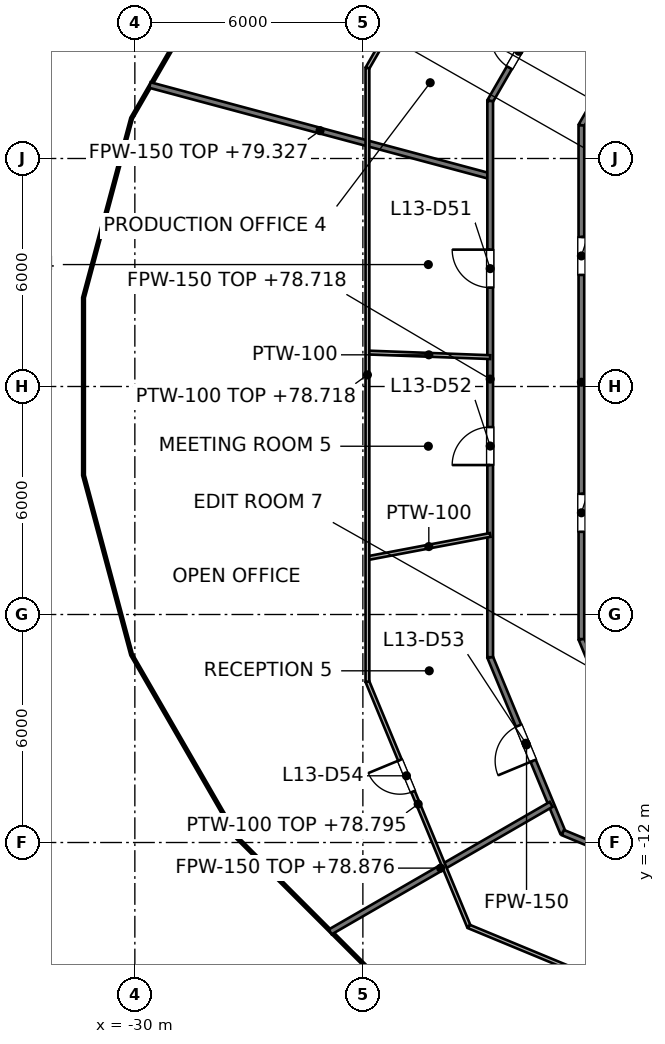
"""IFC4 building model, lengths in metres.
Left out: names, types, materials, properties, quantities, classifications, styles, units other than length and angle.
Written with IfcOpenShell. Run it as: python <this file> out.ifc"""

import sys

from ifc_helpers import new_model, si_unit, direction, frame, frame_2d, origin, place, context, subcontext, project, spatial, rectangle, extrude, element, fill, save


model = new_model("IFC4")
c1 = context("Model", 3, precision=1e-05, world=origin(), true_north=direction((0.0, 1.0)))
c2 = subcontext(c1, "Body", "Model", "MODEL_VIEW")
j1 = project(units=[si_unit("LENGTHUNIT", "METRE"), si_unit("PLANEANGLEUNIT", "RADIAN")], contexts=[c1])
p1 = place(None, origin())
s1 = spatial("IfcSite", under=j1, at=p1, CompositionType="ELEMENT")
p2 = place(p1, origin())
s2 = spatial("IfcBuilding", under=s1, at=p2, CompositionType="ELEMENT")
p3 = place(p2, frame((0.0, 0.0, 75.6)))
s3 = spatial("IfcBuildingStorey", under=s2, at=p3, CompositionType="ELEMENT", Elevation=75.6)
p4 = place(p3, frame((-20.65, -7.124, 0.0), z_axis=(0.0, 0.0, 1.0), x_axis=(0.382941772901, -0.923772482036, 0.0)))
e1 = element("IfcWall", 1, at=p4, inside=s3, PredefinedType="PARTITIONING", context=c2, shape_type="SweptSolid", body=[
    extrude(rectangle(XDim=4.994, YDim=0.15, at=frame_2d((2.497, 0.0))), origin(), (0.0, 0.0, 1.0), 3.195),
])
p5 = place(p4, frame((1.95, 0.0, 0.0)))
e2 = element("IfcOpeningElement", 2, at=p5, cuts=e1, PredefinedType="OPENING", context=c2, shape_type="SweptSolid", body=[
    extrude(rectangle(XDim=1.0, YDim=2.1, at=frame_2d((0.5, 1.05))), frame((0.0, 0.075, 0.0), z_axis=(0.0, -1.0, 0.0), x_axis=(1.0, 0.0, 0.0)), (0.0, 0.0, 1.0), 0.15),
])
p6 = place(p3, frame((-18.25, -6.647, 0.0), z_axis=(0.0, 0.0, 1.0), x_axis=(0.383000597973, -0.923748094424, 0.0)))
e3 = element("IfcWall", 3, at=p6, inside=s3, PredefinedType="PARTITIONING", context=c2, shape_type="SweptSolid", body=[
    extrude(rectangle(XDim=3.522, YDim=0.15, at=frame_2d((1.761, 0.0))), origin(), (0.0, 0.0, 1.0), 3.195),
])
p7 = place(p3, frame((-18.738, -11.738, 0.0), z_axis=(0.0, 0.0, 1.0), x_axis=(0.923848598814, -0.38275810438, 0.0)))
e4 = element("IfcWall", 4, at=p7, inside=s3, PredefinedType="PARTITIONING", context=c2, shape_type="SweptSolid", body=[
    extrude(rectangle(XDim=5.024, YDim=0.15, at=frame_2d((2.512, 0.0))), origin(), (0.0, 0.0, 1.0), 3.195),
])
p8 = place(p7, frame((2.012, 0.0, 0.0)))
e5 = element("IfcOpeningElement", 5, at=p8, cuts=e4, PredefinedType="OPENING", context=c2, shape_type="SweptSolid", body=[
    extrude(rectangle(XDim=1.0, YDim=2.1, at=frame_2d((0.5, 1.05))), frame((0.0, 0.075, 0.0), z_axis=(0.0, -1.0, 0.0), x_axis=(1.0, 0.0, 0.0)), (0.0, 0.0, 1.0), 0.15),
])
p9 = place(p3, frame((-18.151, 7.042, 0.0), z_axis=(0.0, 0.0, 1.0), x_axis=(0.93232154811, -0.361630378881, 0.0)))
e6 = element("IfcWall", 6, at=p9, inside=s3, PredefinedType="PARTITIONING", context=c2, shape_type="SweptSolid", body=[
    extrude(rectangle(XDim=3.38, YDim=0.15, at=frame_2d((1.69, 0.0))), origin(), (0.0, 0.0, 1.0), 4.05),
])
p10 = place(p3, frame((-29.605, 7.933, 0.0), z_axis=(0.0, 0.0, 1.0), x_axis=(0.965908551929, -0.258883505289, 0.0)))
e7 = element("IfcWall", 7, at=p10, inside=s3, PredefinedType="PARTITIONING", context=c2, shape_type="SweptSolid", body=[
    extrude(rectangle(XDim=9.271, YDim=0.15, at=frame_2d((4.636, 0.0))), origin(), (0.0, 0.0, 1.0), 3.727),
])
p11 = place(p3, frame((-18.25, -0.101, 0.0), z_axis=(0.0, 0.0, 1.0), x_axis=(0.999985777013, 0.005333457795, 0.0)))
e8 = element("IfcWall", 8, at=p11, inside=s3, PredefinedType="PARTITIONING", context=c2, shape_type="SweptSolid", body=[
    extrude(rectangle(XDim=3.25, YDim=0.15, at=frame_2d((1.625, 0.0))), origin(), (0.0, 0.0, 1.0), 3.118),
])
p12 = place(p3, frame((-24.859, -14.352, 0.0), z_axis=(0.0, 0.0, 1.0), x_axis=(0.866036584562, 0.499980633826, 0.0)))
e9 = element("IfcWall", 9, at=p12, inside=s3, PredefinedType="PARTITIONING", context=c2, shape_type="SweptSolid", body=[
    extrude(rectangle(XDim=6.712, YDim=0.15, at=frame_2d((3.356, 0.0))), origin(), (0.0, 0.0, 1.0), 3.276),
])
p13 = place(p3, frame((-18.25, 6.871, 0.0), z_axis=(0.0, 0.0, 1.0), x_axis=(0.500254304961, 0.865878530955, 0.0)))
e10 = element("IfcWall", 10, at=p13, inside=s3, PredefinedType="PARTITIONING", context=c2, shape_type="SweptSolid", body=[
    extrude(rectangle(XDim=4.715, YDim=0.15, at=frame_2d((2.357, 0.0))), origin(), (0.0, 0.0, 1.0), 3.195),
])
p14 = place(p13, frame((1.81, 0.0, 0.0)))
e11 = element("IfcOpeningElement", 11, at=p14, cuts=e10, PredefinedType="OPENING", context=c2, shape_type="SweptSolid", body=[
    extrude(rectangle(XDim=1.0, YDim=2.1, at=frame_2d((0.5, 1.05))), frame((0.0, 0.075, 0.0), z_axis=(0.0, -1.0, 0.0), x_axis=(1.0, 0.0, 0.0)), (0.0, 0.0, 1.0), 0.15),
])
p15 = place(p3, frame((-20.65, 7.514, 0.0), z_axis=(0.0, 0.0, 1.0), x_axis=(0.500199125334, 0.865910408192, 0.0)))
e12 = element("IfcWall", 12, at=p15, inside=s3, PredefinedType="PARTITIONING", context=c2, shape_type="SweptSolid", body=[
    extrude(rectangle(XDim=6.739, YDim=0.15, at=frame_2d((3.369, 0.0))), origin(), (0.0, 0.0, 1.0), 3.195),
])
p16 = place(p15, frame((1.01, 0.0, 0.0)))
e13 = element("IfcOpeningElement", 13, at=p16, cuts=e12, PredefinedType="OPENING", context=c2, shape_type="SweptSolid", body=[
    extrude(rectangle(XDim=1.0, YDim=2.1, at=frame_2d((0.5, 1.05))), frame((0.0, 0.075, 0.0), z_axis=(0.0, -1.0, 0.0), x_axis=(1.0, 0.0, 0.0)), (0.0, 0.0, 1.0), 0.15),
])
p17 = place(p3, frame((-18.25, -6.647, 0.0), z_axis=(0.0, 0.0, 1.0), x_axis=(0.0, 1.0, 0.0)))
e14 = element("IfcWall", 14, at=p17, inside=s3, PredefinedType="PARTITIONING", context=c2, shape_type="SweptSolid", body=[
    extrude(rectangle(XDim=13.518, YDim=0.15, at=frame_2d((6.759, 0.0))), origin(), (0.0, 0.0, 1.0), 3.118),
])
p18 = place(p17, frame((9.583, 0.0, 0.0)))
e15 = element("IfcOpeningElement", 15, at=p18, cuts=e14, PredefinedType="OPENING", context=c2, shape_type="SweptSolid", body=[
    extrude(rectangle(XDim=1.0, YDim=2.1, at=frame_2d((0.5, 1.05))), frame((0.0, 0.075, 0.0), z_axis=(0.0, -1.0, 0.0), x_axis=(1.0, 0.0, 0.0)), (0.0, 0.0, 1.0), 0.15),
])
p19 = place(p17, frame((2.823, 0.0, 0.0)))
e16 = element("IfcOpeningElement", 16, at=p19, cuts=e14, PredefinedType="OPENING", context=c2, shape_type="SweptSolid", body=[
    extrude(rectangle(XDim=1.0, YDim=2.1, at=frame_2d((0.5, 1.05))), frame((0.0, 0.075, 0.0), z_axis=(0.0, -1.0, 0.0), x_axis=(1.0, 0.0, 0.0)), (0.0, 0.0, 1.0), 0.15),
])
p20 = place(p3, frame((-20.65, -7.124, 0.0), z_axis=(0.0, 0.0, 1.0), x_axis=(0.0, 1.0, 0.0)))
e17 = element("IfcWall", 17, at=p20, inside=s3, PredefinedType="PARTITIONING", context=c2, shape_type="SweptSolid", body=[
    extrude(rectangle(XDim=14.638, YDim=0.15, at=frame_2d((7.319, 0.0))), origin(), (0.0, 0.0, 1.0), 3.118),
])
p21 = place(p20, frame((9.726, 0.0, 0.0)))
e18 = element("IfcOpeningElement", 18, at=p21, cuts=e17, PredefinedType="OPENING", context=c2, shape_type="SweptSolid", body=[
    extrude(rectangle(XDim=1.0, YDim=2.1, at=frame_2d((0.5, 1.05))), frame((0.0, 0.075, 0.0), z_axis=(0.0, -1.0, 0.0), x_axis=(1.0, 0.0, 0.0)), (0.0, 0.0, 1.0), 0.15),
])
p22 = place(p20, frame((5.057, 0.0, 0.0)))
e19 = element("IfcOpeningElement", 19, at=p22, cuts=e17, PredefinedType="OPENING", context=c2, shape_type="SweptSolid", body=[
    extrude(rectangle(XDim=1.0, YDim=2.1, at=frame_2d((0.5, 1.05))), frame((0.0, 0.075, 0.0), z_axis=(0.0, -1.0, 0.0), x_axis=(1.0, 0.0, 0.0)), (0.0, 0.0, 1.0), 0.15),
])
p23 = place(p3, frame((-23.88, -7.767, 0.0), z_axis=(0.0, 0.0, 1.0), x_axis=(0.382859836194, -0.923806443921, 0.0)))
e20 = element("IfcWall", 20, at=p23, inside=s3, PredefinedType="PARTITIONING", context=c2, shape_type="SweptSolid", body=[
    extrude(rectangle(XDim=6.974, YDim=0.1, at=frame_2d((3.487, 0.0))), origin(), (0.0, 0.0, 1.0), 3.195),
])
p24 = place(p23, frame((2.232, 0.0, 0.0)))
e21 = element("IfcOpeningElement", 21, at=p24, cuts=e20, PredefinedType="OPENING", context=c2, shape_type="SweptSolid", body=[
    extrude(rectangle(XDim=0.9, YDim=2.1, at=frame_2d((0.45, 1.05))), frame((0.0, 0.05, 0.0), z_axis=(0.0, -1.0, 0.0), x_axis=(1.0, 0.0, 0.0)), (0.0, 0.0, 1.0), 0.1),
])
p25 = place(p3, frame((-21.21, -14.21, 0.0), z_axis=(0.0, 0.0, 1.0), x_axis=(0.923854909606, -0.382742871909, 0.0)))
e22 = element("IfcWall", 22, at=p25, inside=s3, PredefinedType="PARTITIONING", context=c2, shape_type="SweptSolid", body=[
    extrude(rectangle(XDim=7.021, YDim=0.1, at=frame_2d((3.51, 0.0))), origin(), (0.0, 0.0, 1.0), 3.127),
])
p26 = place(p3, frame((-23.88, 0.894, 0.0), z_axis=(0.0, 0.0, 1.0), x_axis=(0.999297969227, -0.037464232255, 0.0)))
e23 = element("IfcWall", 23, at=p26, inside=s3, PredefinedType="PARTITIONING", context=c2, shape_type="SweptSolid", body=[
    extrude(rectangle(XDim=3.232, YDim=0.1, at=frame_2d((1.616, 0.0))), origin(), (0.0, 0.0, 1.0), 4.05),
])
p27 = place(p3, frame((-23.88, -4.518, 0.0), z_axis=(0.0, 0.0, 1.0), x_axis=(0.982569879067, 0.185893605994, 0.0)))
e24 = element("IfcWall", 24, at=p27, inside=s3, PredefinedType="PARTITIONING", context=c2, shape_type="SweptSolid", body=[
    extrude(rectangle(XDim=3.287, YDim=0.1, at=frame_2d((1.644, 0.0))), origin(), (0.0, 0.0, 1.0), 4.05),
])
p28 = place(p3, frame((-23.88, 8.379, 0.0), z_axis=(0.0, 0.0, 1.0), x_axis=(0.499871577197, 0.86609953603, 0.0)))
e25 = element("IfcWall", 25, at=p28, inside=s3, PredefinedType="PARTITIONING", context=c2, shape_type="SweptSolid", body=[
    extrude(rectangle(XDim=9.448, YDim=0.1, at=frame_2d((4.724, 0.0))), origin(), (0.0, 0.0, 1.0), 3.195),
])
p29 = place(p28, frame((4.325, 0.0, 0.0)))
e26 = element("IfcOpeningElement", 26, at=p29, cuts=e25, PredefinedType="OPENING", context=c2, shape_type="SweptSolid", body=[
    extrude(rectangle(XDim=0.9, YDim=2.1, at=frame_2d((0.45, 1.05))), frame((0.0, 0.05, 0.0), z_axis=(0.0, -1.0, 0.0), x_axis=(1.0, 0.0, 0.0)), (0.0, 0.0, 1.0), 0.1),
])
p30 = place(p3, frame((-23.88, -7.767, 0.0), z_axis=(0.0, 0.0, 1.0), x_axis=(0.0, 1.0, 0.0)))
e27 = element("IfcWall", 27, at=p30, inside=s3, PredefinedType="PARTITIONING", context=c2, shape_type="SweptSolid", body=[
    extrude(rectangle(XDim=16.146, YDim=0.1, at=frame_2d((8.073, 0.0))), origin(), (0.0, 0.0, 1.0), 3.118),
])
p31 = place(p18, origin())
e28 = element("IfcDoor", 28, at=p31, inside=s3, OperationType="SINGLE_SWING_RIGHT", PredefinedType="DOOR", context=c2, shape_type="SweptSolid", body=[
    extrude(rectangle(XDim=1.0, YDim=2.1, at=frame_2d((0.5, 1.05))), frame((0.0, 0.025, 0.0), z_axis=(0.0, -1.0, 0.0), x_axis=(1.0, 0.0, 0.0)), (0.0, 0.0, 1.0), 0.05),
])
fill(e15, e28)
p32 = place(p19, origin())
e29 = element("IfcDoor", 29, at=p32, inside=s3, OperationType="SINGLE_SWING_RIGHT", PredefinedType="DOOR", context=c2, shape_type="SweptSolid", body=[
    extrude(rectangle(XDim=1.0, YDim=2.1, at=frame_2d((0.5, 1.05))), frame((0.0, 0.025, 0.0), z_axis=(0.0, -1.0, 0.0), x_axis=(1.0, 0.0, 0.0)), (0.0, 0.0, 1.0), 0.05),
])
fill(e16, e29)
p33 = place(p16, origin())
e30 = element("IfcDoor", 30, at=p33, inside=s3, OperationType="SINGLE_SWING_RIGHT", PredefinedType="DOOR", context=c2, shape_type="SweptSolid", body=[
    extrude(rectangle(XDim=1.0, YDim=2.1, at=frame_2d((0.5, 1.05))), frame((0.0, 0.025, 0.0), z_axis=(0.0, -1.0, 0.0), x_axis=(1.0, 0.0, 0.0)), (0.0, 0.0, 1.0), 0.05),
])
fill(e13, e30)
p34 = place(p21, origin())
e31 = element("IfcDoor", 31, at=p34, inside=s3, OperationType="SINGLE_SWING_RIGHT", PredefinedType="DOOR", context=c2, shape_type="SweptSolid", body=[
    extrude(rectangle(XDim=1.0, YDim=2.1, at=frame_2d((0.5, 1.05))), frame((0.0, 0.025, 0.0), z_axis=(0.0, -1.0, 0.0), x_axis=(1.0, 0.0, 0.0)), (0.0, 0.0, 1.0), 0.05),
])
fill(e18, e31)
p35 = place(p22, origin())
e32 = element("IfcDoor", 32, at=p35, inside=s3, OperationType="SINGLE_SWING_LEFT", PredefinedType="DOOR", context=c2, shape_type="SweptSolid", body=[
    extrude(rectangle(XDim=1.0, YDim=2.1, at=frame_2d((0.5, 1.05))), frame((0.0, 0.025, 0.0), z_axis=(0.0, -1.0, 0.0), x_axis=(1.0, 0.0, 0.0)), (0.0, 0.0, 1.0), 0.05),
])
fill(e19, e32)
p36 = place(p5, origin())
e33 = element("IfcDoor", 33, at=p36, inside=s3, OperationType="SINGLE_SWING_RIGHT", PredefinedType="DOOR", context=c2, shape_type="SweptSolid", body=[
    extrude(rectangle(XDim=1.0, YDim=2.1, at=frame_2d((0.5, 1.05))), frame((0.0, 0.025, 0.0), z_axis=(0.0, -1.0, 0.0), x_axis=(1.0, 0.0, 0.0)), (0.0, 0.0, 1.0), 0.05),
])
fill(e2, e33)
p37 = place(p24, origin())
e34 = element("IfcDoor", 34, at=p37, inside=s3, OperationType="SINGLE_SWING_LEFT", PredefinedType="DOOR", context=c2, shape_type="SweptSolid", body=[
    extrude(rectangle(XDim=0.9, YDim=2.1, at=frame_2d((0.45, 1.05))), frame((0.0, 0.025, 0.0), z_axis=(0.0, -1.0, 0.0), x_axis=(1.0, 0.0, 0.0)), (0.0, 0.0, 1.0), 0.05),
])
fill(e21, e34)
save(model, sys.argv[1])
